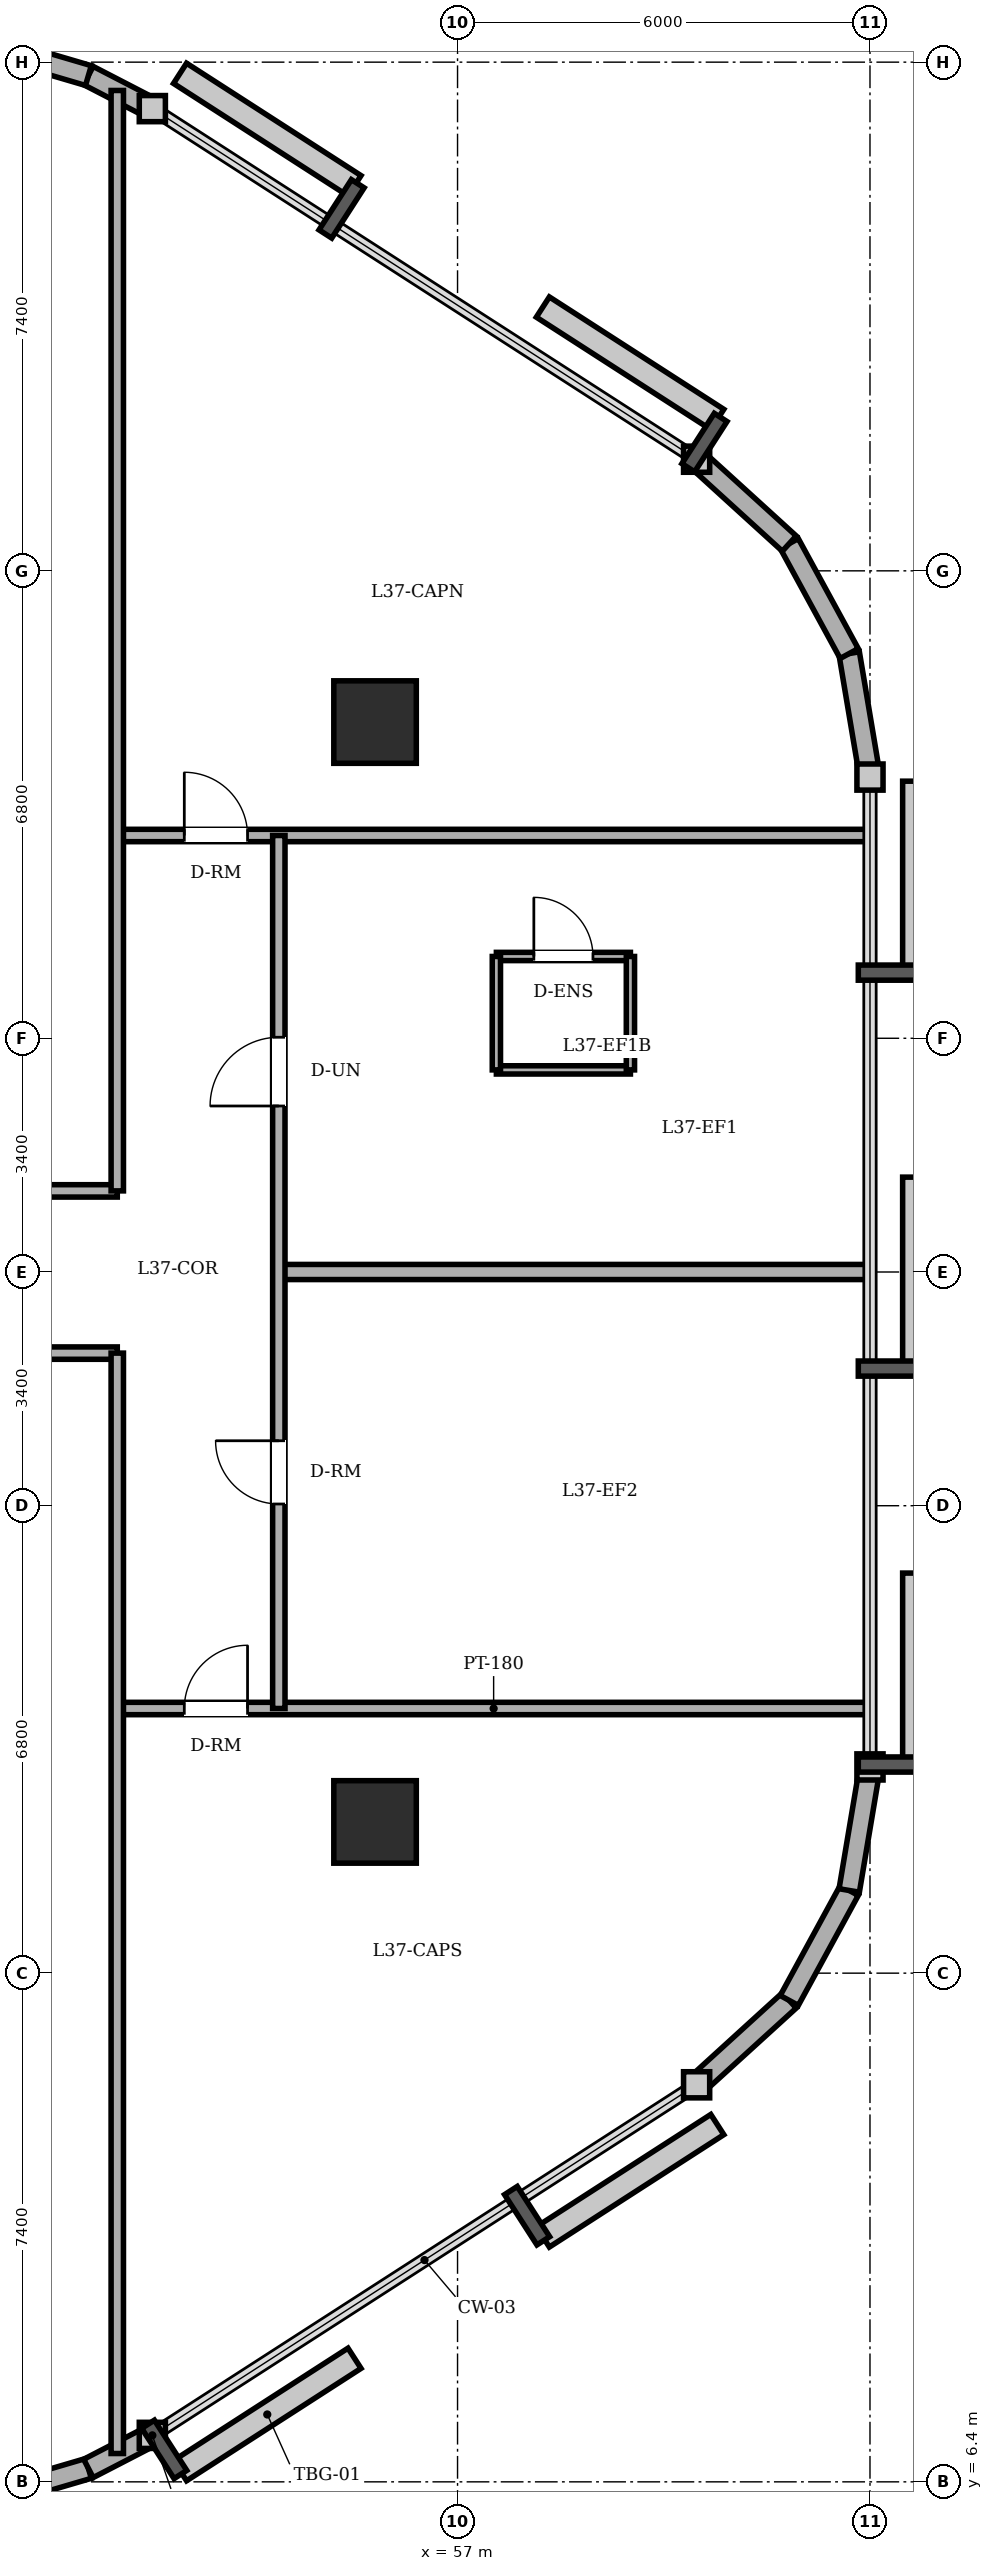
"""IFC4 building model, lengths in metres.
Left out: names, types, materials, properties, quantities, classifications, styles, units other than length and angle.
Written with IfcOpenShell. Run it as: python <this file> out.ifc"""

import sys

from ifc_helpers import new_model, si_unit, direction, frame, frame_2d, origin, origin_2d, place, context, subcontext, project, spatial, rectangle, circle, extrude, element, fill, save


model = new_model("IFC4")
c1 = context("Model", 3, precision=1e-05, world=origin(), true_north=direction((0.0, 1.0)))
c2 = subcontext(c1, "Body", "Model", "MODEL_VIEW")
j1 = project(units=[si_unit("LENGTHUNIT", "METRE"), si_unit("PLANEANGLEUNIT", "RADIAN")], contexts=[c1])
p1 = place(None, origin())
s1 = spatial("IfcSite", under=j1, at=p1, CompositionType="ELEMENT")
p2 = place(p1, origin())
s2 = spatial("IfcBuilding", under=s1, at=p2, CompositionType="ELEMENT")
p3 = place(p2, frame((0.0, 0.0, 143.8)))
s3 = spatial("IfcBuildingStorey", under=s2, at=p3, CompositionType="ELEMENT", Elevation=143.8)
for number, where, z_axis, x_axis in (
    (1, (55.8, 16.0, 0.0), (0.0, 0.0, 1.0), (1.0, 0.0, 0.0)),
    (2, (55.8, 32.0, 0.0), (0.0, 0.0, 1.0), (1.0, 0.0, 0.0)),
):
    element("IfcColumn", number, at=place(p3, frame(where, z_axis=z_axis, x_axis=x_axis)), inside=s3, PredefinedType="COLUMN", context=c2, shape_type="SweptSolid", body=[
        extrude(circle(Radius=0.6, at=origin_2d()), origin(), (0.0, 0.0, 1.0), 3.6),
    ])
p4 = place(p3, frame((50.625, 6.3, 0.0), z_axis=(0.0, 0.0, 1.0), x_axis=(0.959528674476, 0.281610942363, 0.0)))
e3 = element("IfcWall", 3, at=p4, inside=s3, PredefinedType="SOLIDWALL", context=c2, shape_type="SweptSolid", body=[
    extrude(rectangle(XDim=1.047, YDim=0.3, at=frame_2d((0.524, 0.0))), origin(), (0.0, 0.0, 1.0), 3.4),
])
p5 = place(p3, frame((51.63, 6.595, 0.0), z_axis=(0.0, 0.0, 1.0), x_axis=(0.888283247196, 0.459296062198, 0.0)))
e4 = element("IfcWall", 4, at=p5, inside=s3, PredefinedType="SOLIDWALL", context=c2, shape_type="SweptSolid", body=[
    extrude(rectangle(XDim=1.047, YDim=0.3, at=frame_2d((0.523, 0.0))), origin(), (0.0, 0.0, 1.0), 3.4),
])
p6 = place(p3, frame((60.478, 12.176, 0.0), z_axis=(0.0, 0.0, 1.0), x_axis=(0.73947929393, 0.673179302897, 0.0)))
e5 = element("IfcWall", 5, at=p6, inside=s3, PredefinedType="SOLIDWALL", context=c2, shape_type="SweptSolid", body=[
    extrude(rectangle(XDim=1.823, YDim=0.3, at=frame_2d((0.911, 0.0))), origin(), (0.0, 0.0, 1.0), 3.4),
])
p7 = place(p3, frame((61.826, 13.403, 0.0), z_axis=(0.0, 0.0, 1.0), x_axis=(0.478608030646, 0.878028674362, 0.0)))
e6 = element("IfcWall", 6, at=p7, inside=s3, PredefinedType="SOLIDWALL", context=c2, shape_type="SweptSolid", body=[
    extrude(rectangle(XDim=1.822, YDim=0.3, at=frame_2d((0.911, 0.0))), origin(), (0.0, 0.0, 1.0), 3.4),
])
for number, where, z_axis, x_axis in (
    (7, (62.698, 15.003, 0.0), (0.0, 0.0, 1.0), (0.166, 0.986, 0.0)),
    (8, (63.0, 31.2, 0.0), (0.0, 0.0, 1.0), (-0.166, 0.986, 0.0)),
):
    element("IfcWall", number, at=place(p3, frame(where, z_axis=z_axis, x_axis=x_axis)), inside=s3, PredefinedType="SOLIDWALL", context=c2, shape_type="SweptSolid", body=[
        extrude(rectangle(XDim=1.822, YDim=0.3, at=frame_2d((0.911, 0.0))), origin(), (0.0, 0.0, 1.0), 3.4),
    ])
p8 = place(p3, frame((62.698, 32.997, 0.0), z_axis=(0.0, 0.0, 1.0), x_axis=(-0.478608030646, 0.878028674362, 0.0)))
e9 = element("IfcWall", 9, at=p8, inside=s3, PredefinedType="SOLIDWALL", context=c2, shape_type="SweptSolid", body=[
    extrude(rectangle(XDim=1.822, YDim=0.3, at=frame_2d((0.911, 0.0))), origin(), (0.0, 0.0, 1.0), 3.4),
])
p9 = place(p3, frame((61.826, 34.597, 0.0), z_axis=(0.0, 0.0, 1.0), x_axis=(-0.73947929393, 0.673179302897, 0.0)))
e10 = element("IfcWall", 10, at=p9, inside=s3, PredefinedType="SOLIDWALL", context=c2, shape_type="SweptSolid", body=[
    extrude(rectangle(XDim=1.823, YDim=0.3, at=frame_2d((0.911, 0.0))), origin(), (0.0, 0.0, 1.0), 3.4),
])
p10 = place(p3, frame((52.56, 40.924, 0.0), z_axis=(0.0, 0.0, 1.0), x_axis=(-0.888283247196, 0.459296062198, 0.0)))
e11 = element("IfcWall", 11, at=p10, inside=s3, PredefinedType="SOLIDWALL", context=c2, shape_type="SweptSolid", body=[
    extrude(rectangle(XDim=1.047, YDim=0.3, at=frame_2d((0.523, 0.0))), origin(), (0.0, 0.0, 1.0), 3.4),
])
p11 = place(p3, frame((51.63, 41.405, 0.0), z_axis=(0.0, 0.0, 1.0), x_axis=(-0.959528674476, 0.281610942363, 0.0)))
e12 = element("IfcWall", 12, at=p11, inside=s3, PredefinedType="SOLIDWALL", context=c2, shape_type="SweptSolid", body=[
    extrude(rectangle(XDim=1.047, YDim=0.3, at=frame_2d((0.524, 0.0))), origin(), (0.0, 0.0, 1.0), 3.4),
])
p12 = place(p3, frame((57.565, 28.59, 0.0), z_axis=(0.0, 0.0, 1.0), x_axis=(1.0, 0.0, 0.0)))
e13 = element("IfcWall", 13, at=p12, inside=s3, PredefinedType="PARTITIONING", context=c2, shape_type="SweptSolid", body=[
    extrude(rectangle(XDim=1.95, YDim=0.12, at=frame_2d((0.975, 0.0))), origin(), (0.0, 0.0, 1.0), 3.4),
])
p13 = place(p12, frame((0.545, 0.0, 0.0)))
e14 = element("IfcOpeningElement", 14, at=p13, cuts=e13, PredefinedType="OPENING", context=c2, shape_type="SweptSolid", body=[
    extrude(rectangle(XDim=0.86, YDim=2.1, at=frame_2d((0.43, 1.05))), frame((0.0, 0.07, 0.0), z_axis=(0.0, -1.0, 0.0), x_axis=(1.0, 0.0, 0.0)), (0.0, 0.0, 1.0), 0.14),
])
p14 = place(p3, frame((59.515, 26.94, 0.0), z_axis=(0.0, 0.0, 1.0), x_axis=(-1.0, 0.0, 0.0)))
e15 = element("IfcWall", 15, at=p14, inside=s3, PredefinedType="PARTITIONING", context=c2, shape_type="SweptSolid", body=[
    extrude(rectangle(XDim=1.95, YDim=0.12, at=frame_2d((0.975, 0.0))), origin(), (0.0, 0.0, 1.0), 3.4),
])
for number, where, z_axis, x_axis in (
    (16, (57.565, 28.59, 0.0), (0.0, 0.0, 1.0), (0.0, -1.0, 0.0)),
    (17, (59.515, 26.94, 0.0), (0.0, 0.0, 1.0), (0.0, 1.0, 0.0)),
):
    element("IfcWall", number, at=place(p3, frame(where, z_axis=z_axis, x_axis=x_axis)), inside=s3, PredefinedType="PARTITIONING", context=c2, shape_type="SweptSolid", body=[
        extrude(rectangle(XDim=1.65, YDim=0.12, at=frame_2d((0.825, 0.0))), origin(), (0.0, 0.0, 1.0), 3.4),
    ])
p15 = place(p3, frame((52.05, 17.65, 0.0), z_axis=(0.0, 0.0, 1.0), x_axis=(1.0, 0.0, 0.0)))
e18 = element("IfcWall", 18, at=p15, inside=s3, PredefinedType="PARTITIONING", context=c2, shape_type="SweptSolid", body=[
    extrude(rectangle(XDim=10.95, YDim=0.18, at=frame_2d((5.475, 0.0))), origin(), (0.0, 0.0, 1.0), 3.4),
])
p16 = place(p15, frame((0.975, 0.0, 0.0)))
e19 = element("IfcOpeningElement", 19, at=p16, cuts=e18, PredefinedType="OPENING", context=c2, shape_type="SweptSolid", body=[
    extrude(rectangle(XDim=0.92, YDim=2.1, at=frame_2d((0.46, 1.05))), frame((0.0, 0.1, 0.0), z_axis=(0.0, -1.0, 0.0), x_axis=(1.0, 0.0, 0.0)), (0.0, 0.0, 1.0), 0.2),
])
p17 = place(p3, frame((39.85, 22.82, 0.0), z_axis=(0.0, 0.0, 1.0), x_axis=(1.0, 0.0, 0.0)))
e20 = element("IfcWall", 20, at=p17, inside=s3, PredefinedType="PARTITIONING", context=c2, shape_type="SweptSolid", body=[
    extrude(rectangle(XDim=12.2, YDim=0.18, at=frame_2d((6.1, 0.0))), origin(), (0.0, 0.0, 1.0), 3.4),
])
p18 = place(p17, frame((9.366, 0.0, 0.0)))
e21 = element("IfcOpeningElement", 21, at=p18, cuts=e20, PredefinedType="OPENING", context=c2, shape_type="SweptSolid", body=[
    extrude(rectangle(XDim=1.0, YDim=2.15, at=frame_2d((0.5, 1.075))), frame((0.0, 0.1, 0.0), z_axis=(0.0, -1.0, 0.0), x_axis=(1.0, 0.0, 0.0)), (0.0, 0.0, 1.0), 0.2),
])
p19 = place(p3, frame((54.4, 24.0, 0.0), z_axis=(0.0, 0.0, 1.0), x_axis=(1.0, 0.0, 0.0)))
e22 = element("IfcWall", 22, at=p19, inside=s3, PredefinedType="PARTITIONING", context=c2, shape_type="SweptSolid", body=[
    extrude(rectangle(XDim=8.6, YDim=0.22, at=frame_2d((4.3, 0.0))), origin(), (0.0, 0.0, 1.0), 3.182),
])
p20 = place(p3, frame((39.85, 25.18, 0.0), z_axis=(0.0, 0.0, 1.0), x_axis=(1.0, 0.0, 0.0)))
e23 = element("IfcWall", 23, at=p20, inside=s3, PredefinedType="PARTITIONING", context=c2, shape_type="SweptSolid", body=[
    extrude(rectangle(XDim=12.2, YDim=0.18, at=frame_2d((6.1, 0.0))), origin(), (0.0, 0.0, 1.0), 3.4),
])
p21 = place(p20, frame((7.97, 0.0, 0.0)))
e24 = element("IfcOpeningElement", 24, at=p21, cuts=e23, PredefinedType="OPENING", context=c2, shape_type="SweptSolid", body=[
    extrude(rectangle(XDim=1.0, YDim=2.15, at=frame_2d((0.5, 1.075))), frame((0.0, 0.1, 0.0), z_axis=(0.0, -1.0, 0.0), x_axis=(1.0, 0.0, 0.0)), (0.0, 0.0, 1.0), 0.2),
])
p22 = place(p3, frame((52.05, 30.35, 0.0), z_axis=(0.0, 0.0, 1.0), x_axis=(1.0, 0.0, 0.0)))
e25 = element("IfcWall", 25, at=p22, inside=s3, PredefinedType="PARTITIONING", context=c2, shape_type="SweptSolid", body=[
    extrude(rectangle(XDim=10.95, YDim=0.18, at=frame_2d((5.475, 0.0))), origin(), (0.0, 0.0, 1.0), 3.4),
])
p23 = place(p22, frame((0.975, 0.0, 0.0)))
e26 = element("IfcOpeningElement", 26, at=p23, cuts=e25, PredefinedType="OPENING", context=c2, shape_type="SweptSolid", body=[
    extrude(rectangle(XDim=0.92, YDim=2.1, at=frame_2d((0.46, 1.05))), frame((0.0, 0.1, 0.0), z_axis=(0.0, -1.0, 0.0), x_axis=(1.0, 0.0, 0.0)), (0.0, 0.0, 1.0), 0.2),
])
for number, where, z_axis, x_axis in (
    (27, (52.05, 6.812, 0.0), (0.0, 0.0, 1.0), (0.0, 1.0, 0.0)),
    (28, (52.05, 25.18, 0.0), (0.0, 0.0, 1.0), (0.0, 1.0, 0.0)),
):
    element("IfcWall", number, at=place(p3, frame(where, z_axis=z_axis, x_axis=x_axis)), inside=s3, PredefinedType="PARTITIONING", context=c2, shape_type="SweptSolid", body=[
        extrude(rectangle(XDim=16.008, YDim=0.18, at=frame_2d((8.004, 0.0))), origin(), (0.0, 0.0, 1.0), 3.4),
    ])
p24 = place(p3, frame((54.4, 17.65, 0.0), z_axis=(0.0, 0.0, 1.0), x_axis=(0.0, 1.0, 0.0)))
e29 = element("IfcWall", 29, at=p24, inside=s3, PredefinedType="PARTITIONING", context=c2, shape_type="SweptSolid", body=[
    extrude(rectangle(XDim=12.7, YDim=0.18, at=frame_2d((6.35, 0.0))), origin(), (0.0, 0.0, 1.0), 3.4),
])
p25 = place(p24, frame((8.765, 0.0, 0.0)))
e30 = element("IfcOpeningElement", 30, at=p25, cuts=e29, PredefinedType="OPENING", context=c2, shape_type="SweptSolid", body=[
    extrude(rectangle(XDim=1.0, YDim=2.15, at=frame_2d((0.5, 1.075))), frame((0.0, 0.1, 0.0), z_axis=(0.0, -1.0, 0.0), x_axis=(1.0, 0.0, 0.0)), (0.0, 0.0, 1.0), 0.2),
])
p26 = place(p24, frame((2.975, 0.0, 0.0)))
e31 = element("IfcOpeningElement", 31, at=p26, cuts=e29, PredefinedType="OPENING", context=c2, shape_type="SweptSolid", body=[
    extrude(rectangle(XDim=0.92, YDim=2.1, at=frame_2d((0.46, 1.05))), frame((0.0, 0.1, 0.0), z_axis=(0.0, -1.0, 0.0), x_axis=(1.0, 0.0, 0.0)), (0.0, 0.0, 1.0), 0.2),
])
p27 = place(p13, origin())
e32 = element("IfcDoor", 32, at=p27, inside=s3, OperationType="SINGLE_SWING_LEFT", PredefinedType="DOOR", context=c2, shape_type="SweptSolid", body=[
    extrude(rectangle(XDim=0.86, YDim=2.1, at=frame_2d((0.43, 1.05))), frame((0.0, 0.025, 0.0), z_axis=(0.0, -1.0, 0.0), x_axis=(1.0, 0.0, 0.0)), (0.0, 0.0, 1.0), 0.05),
])
fill(e14, e32)
p28 = place(p23, origin())
e33 = element("IfcDoor", 33, at=p28, inside=s3, OperationType="SINGLE_SWING_LEFT", PredefinedType="DOOR", context=c2, shape_type="SweptSolid", body=[
    extrude(rectangle(XDim=0.92, YDim=2.1, at=frame_2d((0.46, 1.05))), frame((0.0, 0.025, 0.0), z_axis=(0.0, -1.0, 0.0), x_axis=(1.0, 0.0, 0.0)), (0.0, 0.0, 1.0), 0.05),
])
fill(e26, e33)
p29 = place(p16, origin())
e34 = element("IfcDoor", 34, at=p29, inside=s3, OperationType="SINGLE_SWING_RIGHT", PredefinedType="DOOR", context=c2, shape_type="SweptSolid", body=[
    extrude(rectangle(XDim=0.92, YDim=2.1, at=frame_2d((0.46, 1.05))), frame((0.0, 0.025, 0.0), z_axis=(0.0, -1.0, 0.0), x_axis=(1.0, 0.0, 0.0)), (0.0, 0.0, 1.0), 0.05),
])
fill(e19, e34)
p30 = place(p25, origin())
e35 = element("IfcDoor", 35, at=p30, inside=s3, OperationType="SINGLE_SWING_LEFT", PredefinedType="DOOR", context=c2, shape_type="SweptSolid", body=[
    extrude(rectangle(XDim=1.0, YDim=2.15, at=frame_2d((0.5, 1.075))), frame((0.0, 0.025, 0.0), z_axis=(0.0, -1.0, 0.0), x_axis=(1.0, 0.0, 0.0)), (0.0, 0.0, 1.0), 0.05),
])
fill(e30, e35)
p31 = place(p26, origin())
e36 = element("IfcDoor", 36, at=p31, inside=s3, OperationType="SINGLE_SWING_RIGHT", PredefinedType="DOOR", context=c2, shape_type="SweptSolid", body=[
    extrude(rectangle(XDim=0.92, YDim=2.1, at=frame_2d((0.46, 1.05))), frame((0.0, 0.025, 0.0), z_axis=(0.0, -1.0, 0.0), x_axis=(1.0, 0.0, 0.0)), (0.0, 0.0, 1.0), 0.05),
])
fill(e31, e36)
save(model, sys.argv[1])
